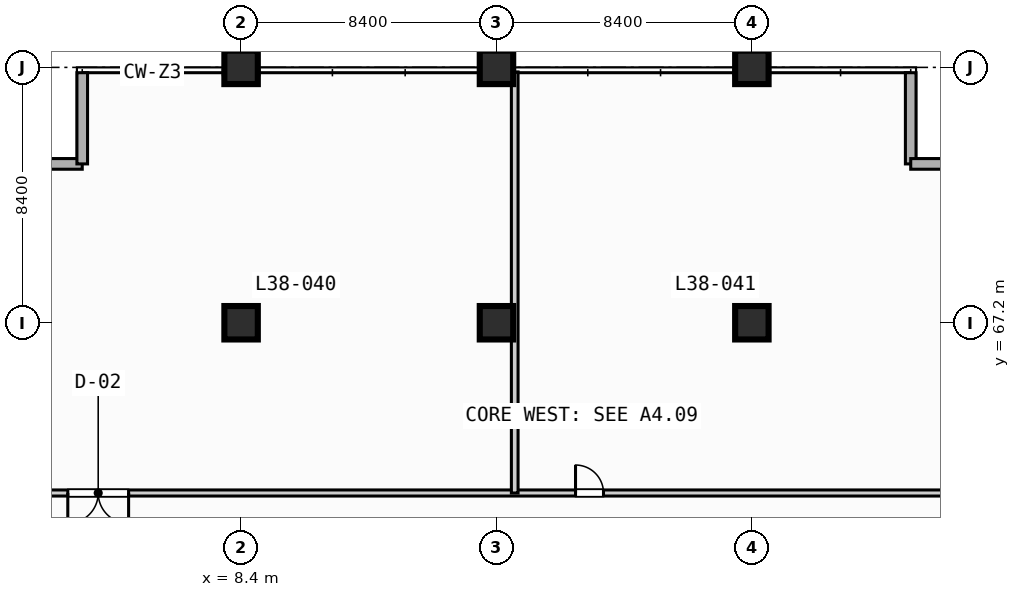
"""IFC4 building model, lengths in metres.
Left out: names, types, materials, properties, quantities, classifications, styles, units other than length and angle.
Written with IfcOpenShell. Run it as: python <this file> out.ifc"""

import sys

from ifc_helpers import new_model, si_unit, direction, frame, frame_2d, origin, origin_2d, place, context, subcontext, project, spatial, rectangle, extrude, element, fill, save


model = new_model("IFC4")
c1 = context("Model", 3, precision=1e-05, world=origin(), true_north=direction((0.0, 1.0)))
c2 = subcontext(c1, "Body", "Model", "MODEL_VIEW")
j1 = project(units=[si_unit("LENGTHUNIT", "METRE"), si_unit("PLANEANGLEUNIT", "RADIAN")], contexts=[c1])
p1 = place(None, origin())
s1 = spatial("IfcSite", under=j1, at=p1, CompositionType="ELEMENT")
p2 = place(p1, origin())
s2 = spatial("IfcBuilding", under=s1, at=p2, CompositionType="ELEMENT")
p3 = place(p2, frame((0.0, 0.0, 157.6)))
s3 = spatial("IfcBuildingStorey", under=s2, at=p3, CompositionType="ELEMENT", Elevation=157.6)
for number, where, z_axis, x_axis in (
    (1, (8.4, 67.2, 0.0), (0.0, 0.0, 1.0), (1.0, 0.0, 0.0)),
    (2, (8.4, 75.6, 0.0), (0.0, 0.0, 1.0), (1.0, 0.0, 0.0)),
    (3, (16.8, 67.2, 0.0), (0.0, 0.0, 1.0), (1.0, 0.0, 0.0)),
    (4, (16.8, 75.6, 0.0), (0.0, 0.0, 1.0), (1.0, 0.0, 0.0)),
    (5, (25.2, 67.2, 0.0), (0.0, 0.0, 1.0), (1.0, 0.0, 0.0)),
    (6, (25.2, 75.6, 0.0), (0.0, 0.0, 1.0), (1.0, 0.0, 0.0)),
):
    element("IfcColumn", number, at=place(p3, frame(where, z_axis=z_axis, x_axis=x_axis)), inside=s3, PredefinedType="COLUMN", context=c2, shape_type="SweptSolid", body=[
        extrude(rectangle(XDim=1.1, YDim=1.1, at=origin_2d()), origin(), (0.0, 0.0, 1.0), 4.4),
    ])
for number, where, z_axis, x_axis in (
    (7, (0.175, 72.425, 0.0), (0.0, 0.0, 1.0), (1.0, 0.0, 0.0)),
    (8, (3.175, 72.425, 0.0), (0.0, 0.0, 1.0), (0.0, 1.0, 0.0)),
    (9, (30.425, 75.425, 0.0), (0.0, 0.0, 1.0), (0.0, -1.0, 0.0)),
    (10, (30.425, 72.425, 0.0), (0.0, 0.0, 1.0), (1.0, 0.0, 0.0)),
):
    element("IfcWall", number, at=place(p3, frame(where, z_axis=z_axis, x_axis=x_axis)), inside=s3, PredefinedType="STANDARD", context=c2, shape_type="SweptSolid", body=[
        extrude(rectangle(XDim=3.0, YDim=0.35, at=frame_2d((1.5, 0.0))), origin(), (0.0, 0.0, 1.0), 4.05),
    ])
p4 = place(p3, frame((0.3, 61.6, 0.0), z_axis=(0.0, 0.0, 1.0), x_axis=(1.0, 0.0, 0.0)))
e11 = element("IfcWall", 11, at=p4, inside=s3, PredefinedType="PARTITIONING", context=c2, shape_type="SweptSolid", body=[
    extrude(rectangle(XDim=33.0, YDim=0.2, at=frame_2d((16.5, 0.0))), origin(), (0.0, 0.0, 1.0), 4.05),
])
p5 = place(p4, frame((2.4, 0.0, 0.0)))
e12 = element("IfcOpeningElement", 12, at=p5, cuts=e11, PredefinedType="OPENING", context=c2, shape_type="SweptSolid", body=[
    extrude(rectangle(XDim=2.0, YDim=2.15, at=frame_2d((1.0, 1.075))), frame((0.0, 0.11, 0.0), z_axis=(0.0, -1.0, 0.0), x_axis=(1.0, 0.0, 0.0)), (0.0, 0.0, 1.0), 0.22),
])
p6 = place(p4, frame((19.1, 0.0, 0.0)))
e13 = element("IfcOpeningElement", 13, at=p6, cuts=e11, PredefinedType="OPENING", context=c2, shape_type="SweptSolid", body=[
    extrude(rectangle(XDim=0.92, YDim=2.1, at=frame_2d((0.46, 1.05))), frame((0.0, 0.11, 0.0), z_axis=(0.0, -1.0, 0.0), x_axis=(1.0, 0.0, 0.0)), (0.0, 0.0, 1.0), 0.22),
])
p7 = place(p3, frame((17.4, 61.6, 0.0), z_axis=(0.0, 0.0, 1.0), x_axis=(0.0, 1.0, 0.0)))
e14 = element("IfcWall", 14, at=p7, inside=s3, PredefinedType="PARTITIONING", context=c2, shape_type="SweptSolid", body=[
    extrude(rectangle(XDim=13.85, YDim=0.22, at=frame_2d((6.925, 0.0))), origin(), (0.0, 0.0, 1.0), 4.05),
])
p8 = place(p5, origin())
e15 = element("IfcDoor", 15, at=p8, inside=s3, OperationType="SINGLE_SWING_RIGHT", PredefinedType="DOOR", context=c2, shape_type="SweptSolid", body=[
    extrude(rectangle(XDim=2.0, YDim=2.15, at=frame_2d((1.0, 1.075))), frame((0.0, 0.025, 0.0), z_axis=(0.0, -1.0, 0.0), x_axis=(1.0, 0.0, 0.0)), (0.0, 0.0, 1.0), 0.05),
])
fill(e12, e15)
p9 = place(p6, origin())
e16 = element("IfcDoor", 16, at=p9, inside=s3, OperationType="SINGLE_SWING_LEFT", PredefinedType="DOOR", context=c2, shape_type="SweptSolid", body=[
    extrude(rectangle(XDim=0.92, YDim=2.1, at=frame_2d((0.46, 1.05))), frame((0.0, 0.025, 0.0), z_axis=(0.0, -1.0, 0.0), x_axis=(1.0, 0.0, 0.0)), (0.0, 0.0, 1.0), 0.05),
])
fill(e13, e16)
save(model, sys.argv[1])
